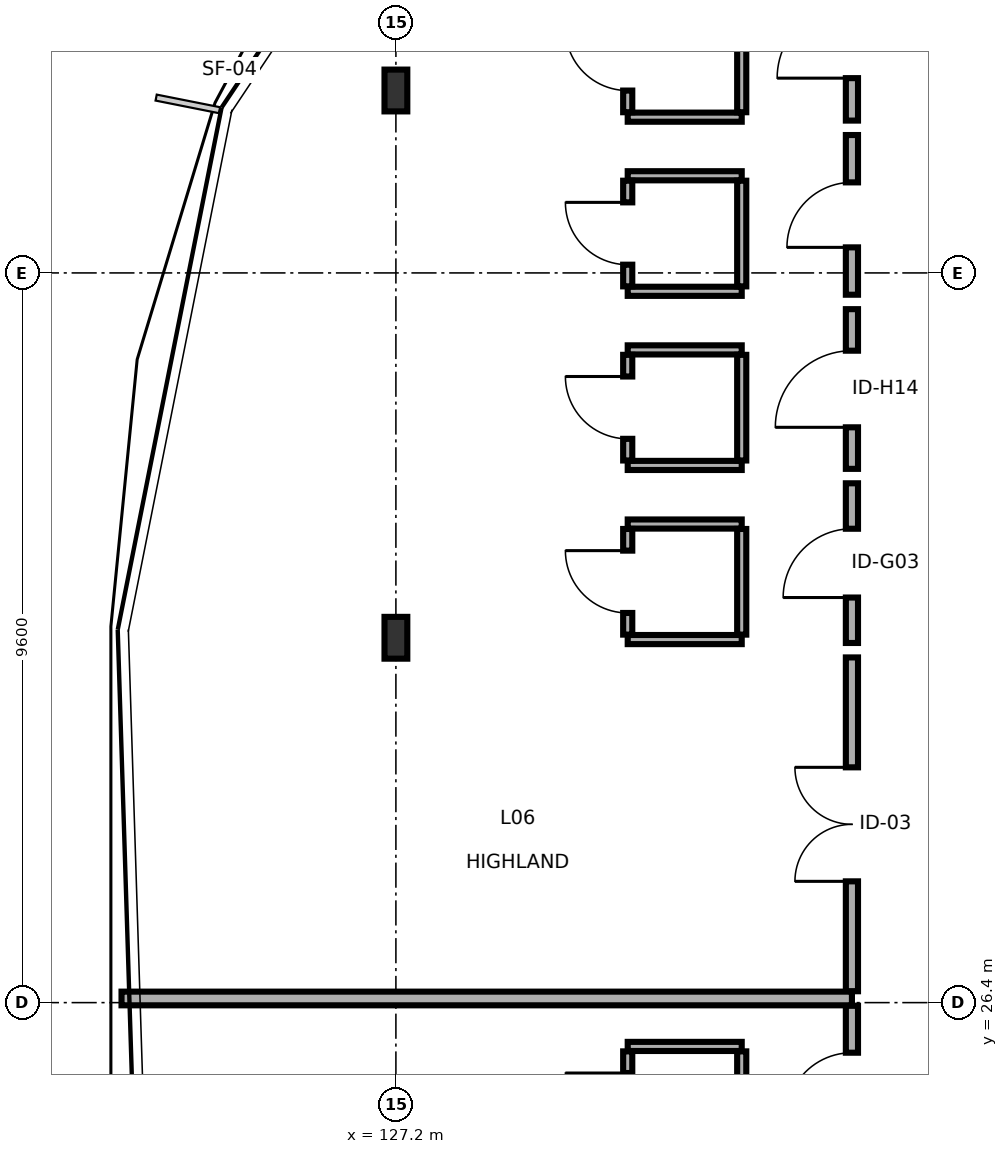
"""IFC4 building model, lengths in metres.
Left out: names, types, materials, properties, quantities, classifications, styles, units other than length and angle.
Written with IfcOpenShell. Run it as: python <this file> out.ifc"""

import sys

from ifc_helpers import new_model, si_unit, direction, frame, frame_2d, origin, origin_2d, place, context, subcontext, project, spatial, rectangle, i_section, extrude, element, fill, save


model = new_model("IFC4")
c1 = context("Model", 3, precision=1e-05, world=origin(), true_north=direction((0.0, 1.0)))
c2 = subcontext(c1, "Body", "Model", "MODEL_VIEW")
j1 = project(units=[si_unit("LENGTHUNIT", "METRE"), si_unit("PLANEANGLEUNIT", "RADIAN")], contexts=[c1])
p1 = place(None, origin())
s1 = spatial("IfcSite", under=j1, at=p1, CompositionType="ELEMENT")
p2 = place(p1, origin())
s2 = spatial("IfcBuilding", under=s1, at=p2, CompositionType="ELEMENT")
p3 = place(p2, frame((0.0, 0.0, 21.5)))
s3 = spatial("IfcBuildingStorey", under=s2, at=p3, CompositionType="ELEMENT", Elevation=21.5)
for number, where, z_axis, x_axis in (
    (1, (127.2, 38.4, 0.0), (0.0, 0.0, 1.0), (1.0, 0.0, 0.0)),
    (2, (127.2, 31.2, 0.0), (0.0, 0.0, 1.0), (1.0, 0.0, 0.0)),
):
    element("IfcColumn", number, at=place(p3, frame(where, z_axis=z_axis, x_axis=x_axis)), inside=s3, PredefinedType="COLUMN", context=c2, shape_type="SweptSolid", body=[
        extrude(i_section(OverallWidth=0.3, OverallDepth=0.55, WebThickness=0.015, FlangeThickness=0.029, FilletRadius=0.027, at=origin_2d()), origin(), (0.0, 0.0, 1.0), 3.4),
    ])
p4 = place(p3, frame((133.2, 26.55, 0.0), z_axis=(0.0, 0.0, 1.0), x_axis=(0.0, 1.0, 0.0)))
e3 = element("IfcWall", 3, at=p4, inside=s3, PredefinedType="PARTITIONING", context=c2, shape_type="SweptSolid", body=[
    extrude(rectangle(XDim=4.392, YDim=0.16, at=frame_2d((2.196, 0.0))), origin(), (0.0, 0.0, 1.0), 3.195),
])
p5 = place(p4, frame((1.446, 0.0, 0.0)))
e4 = element("IfcOpeningElement", 4, at=p5, cuts=e3, PredefinedType="OPENING", context=c2, shape_type="SweptSolid", body=[
    extrude(rectangle(XDim=1.5, YDim=2.25, at=frame_2d((0.75, 1.125))), frame((0.0, 0.09, 0.0), z_axis=(0.0, -1.0, 0.0), x_axis=(1.0, 0.0, 0.0)), (0.0, 0.0, 1.0), 0.18),
])
p6 = place(p3, frame((133.2, 38.004, 0.0), z_axis=(0.0, 0.0, 1.0), x_axis=(0.0, 1.0, 0.0)))
e5 = element("IfcWall", 5, at=p6, inside=s3, PredefinedType="PARTITIONING", context=c2, shape_type="SweptSolid", body=[
    extrude(rectangle(XDim=2.101, YDim=0.16, at=frame_2d((1.05, 0.0))), origin(), (0.0, 0.0, 1.0), 2.73),
])
p7 = place(p6, frame((0.558, 0.0, 0.0)))
e6 = element("IfcOpeningElement", 6, at=p7, cuts=e5, PredefinedType="OPENING", context=c2, shape_type="SweptSolid", body=[
    extrude(rectangle(XDim=0.984, YDim=2.07, at=frame_2d((0.492, 1.035))), frame((0.0, 0.09, 0.0), z_axis=(0.0, -1.0, 0.0), x_axis=(1.0, 0.0, 0.0)), (0.0, 0.0, 1.0), 0.18),
])
p8 = place(p3, frame((130.25, 38.049, 0.0), z_axis=(0.0, 0.0, 1.0), x_axis=(1.0, 0.0, 0.0)))
e7 = element("IfcWall", 7, at=p8, inside=s3, PredefinedType="PARTITIONING", context=c2, shape_type="SweptSolid", body=[
    extrude(rectangle(XDim=1.5, YDim=0.12, at=frame_2d((0.75, 0.0))), origin(), (0.0, 0.0, 1.0), 3.195),
])
p9 = place(p3, frame((130.25, 38.114, 0.0), z_axis=(0.0, 0.0, 1.0), x_axis=(0.0, 1.0, 0.0)))
e8 = element("IfcWall", 8, at=p9, inside=s3, PredefinedType="PARTITIONING", context=c2, shape_type="SweptSolid", body=[
    extrude(rectangle(XDim=1.39, YDim=0.12, at=frame_2d((0.695, 0.0))), origin(), (0.0, 0.0, 1.0), 2.73),
])
p10 = place(p9, frame((0.285, 0.0, 0.0)))
e9 = element("IfcOpeningElement", 9, at=p10, cuts=e8, PredefinedType="OPENING", context=c2, shape_type="SweptSolid", body=[
    extrude(rectangle(XDim=0.82, YDim=2.08, at=frame_2d((0.41, 1.04))), frame((0.0, 0.07, 0.0), z_axis=(0.0, -1.0, 0.0), x_axis=(1.0, 0.0, 0.0)), (0.0, 0.0, 1.0), 0.14),
])
p11 = place(p3, frame((131.75, 38.114, 0.0), z_axis=(0.0, 0.0, 1.0), x_axis=(0.0, 1.0, 0.0)))
e10 = element("IfcWall", 10, at=p11, inside=s3, PredefinedType="PARTITIONING", context=c2, shape_type="SweptSolid", body=[
    extrude(rectangle(XDim=1.39, YDim=0.12, at=frame_2d((0.695, 0.0))), origin(), (0.0, 0.0, 1.0), 2.73),
])
p12 = place(p3, frame((133.2, 35.713, 0.0), z_axis=(0.0, 0.0, 1.0), x_axis=(0.0, 1.0, 0.0)))
e11 = element("IfcWall", 11, at=p12, inside=s3, PredefinedType="PARTITIONING", context=c2, shape_type="SweptSolid", body=[
    extrude(rectangle(XDim=2.101, YDim=0.16, at=frame_2d((1.051, 0.0))), origin(), (0.0, 0.0, 1.0), 3.195),
])
p13 = place(p12, frame((0.623, 0.0, 0.0)))
e12 = element("IfcOpeningElement", 12, at=p13, cuts=e11, PredefinedType="OPENING", context=c2, shape_type="SweptSolid", body=[
    extrude(rectangle(XDim=0.855, YDim=2.05, at=frame_2d((0.427, 1.025))), frame((0.0, 0.09, 0.0), z_axis=(0.0, -1.0, 0.0), x_axis=(1.0, 0.0, 0.0)), (0.0, 0.0, 1.0), 0.18),
])
for number, where, z_axis, x_axis in (
    (13, (130.25, 35.758, 0.0), (0.0, 0.0, 1.0), (1.0, 0.0, 0.0)),
    (14, (130.25, 37.278, 0.0), (0.0, 0.0, 1.0), (1.0, 0.0, 0.0)),
):
    element("IfcWall", number, at=place(p3, frame(where, z_axis=z_axis, x_axis=x_axis)), inside=s3, PredefinedType="PARTITIONING", context=c2, shape_type="SweptSolid", body=[
        extrude(rectangle(XDim=1.5, YDim=0.12, at=frame_2d((0.75, 0.0))), origin(), (0.0, 0.0, 1.0), 3.195),
    ])
p14 = place(p3, frame((130.25, 35.823, 0.0), z_axis=(0.0, 0.0, 1.0), x_axis=(0.0, 1.0, 0.0)))
e15 = element("IfcWall", 15, at=p14, inside=s3, PredefinedType="PARTITIONING", context=c2, shape_type="SweptSolid", body=[
    extrude(rectangle(XDim=1.39, YDim=0.12, at=frame_2d((0.695, 0.0))), origin(), (0.0, 0.0, 1.0), 3.195),
])
p15 = place(p14, frame((0.285, 0.0, 0.0)))
e16 = element("IfcOpeningElement", 16, at=p15, cuts=e15, PredefinedType="OPENING", context=c2, shape_type="SweptSolid", body=[
    extrude(rectangle(XDim=0.82, YDim=2.08, at=frame_2d((0.41, 1.04))), frame((0.0, 0.07, 0.0), z_axis=(0.0, -1.0, 0.0), x_axis=(1.0, 0.0, 0.0)), (0.0, 0.0, 1.0), 0.14),
])
p16 = place(p3, frame((131.75, 35.823, 0.0), z_axis=(0.0, 0.0, 1.0), x_axis=(0.0, 1.0, 0.0)))
e17 = element("IfcWall", 17, at=p16, inside=s3, PredefinedType="PARTITIONING", context=c2, shape_type="SweptSolid", body=[
    extrude(rectangle(XDim=1.39, YDim=0.12, at=frame_2d((0.695, 0.0))), origin(), (0.0, 0.0, 1.0), 3.195),
])
p17 = place(p3, frame((133.2, 33.422, 0.0), z_axis=(0.0, 0.0, 1.0), x_axis=(0.0, 1.0, 0.0)))
e18 = element("IfcWall", 18, at=p17, inside=s3, PredefinedType="PARTITIONING", context=c2, shape_type="SweptSolid", body=[
    extrude(rectangle(XDim=2.101, YDim=0.16, at=frame_2d((1.05, 0.0))), origin(), (0.0, 0.0, 1.0), 3.195),
])
p18 = place(p17, frame((0.546, 0.0, 0.0)))
e19 = element("IfcOpeningElement", 19, at=p18, cuts=e18, PredefinedType="OPENING", context=c2, shape_type="SweptSolid", body=[
    extrude(rectangle(XDim=1.008, YDim=2.13, at=frame_2d((0.504, 1.065))), frame((0.0, 0.09, 0.0), z_axis=(0.0, -1.0, 0.0), x_axis=(1.0, 0.0, 0.0)), (0.0, 0.0, 1.0), 0.18),
])
for number, where, z_axis, x_axis in (
    (20, (130.25, 33.467, 0.0), (0.0, 0.0, 1.0), (1.0, 0.0, 0.0)),
    (21, (130.25, 34.987, 0.0), (0.0, 0.0, 1.0), (1.0, 0.0, 0.0)),
):
    element("IfcWall", number, at=place(p3, frame(where, z_axis=z_axis, x_axis=x_axis)), inside=s3, PredefinedType="PARTITIONING", context=c2, shape_type="SweptSolid", body=[
        extrude(rectangle(XDim=1.5, YDim=0.12, at=frame_2d((0.75, 0.0))), origin(), (0.0, 0.0, 1.0), 3.195),
    ])
p19 = place(p3, frame((130.25, 33.532, 0.0), z_axis=(0.0, 0.0, 1.0), x_axis=(0.0, 1.0, 0.0)))
e22 = element("IfcWall", 22, at=p19, inside=s3, PredefinedType="PARTITIONING", context=c2, shape_type="SweptSolid", body=[
    extrude(rectangle(XDim=1.39, YDim=0.12, at=frame_2d((0.695, 0.0))), origin(), (0.0, 0.0, 1.0), 3.195),
])
p20 = place(p19, frame((0.285, 0.0, 0.0)))
e23 = element("IfcOpeningElement", 23, at=p20, cuts=e22, PredefinedType="OPENING", context=c2, shape_type="SweptSolid", body=[
    extrude(rectangle(XDim=0.82, YDim=2.08, at=frame_2d((0.41, 1.04))), frame((0.0, 0.07, 0.0), z_axis=(0.0, -1.0, 0.0), x_axis=(1.0, 0.0, 0.0)), (0.0, 0.0, 1.0), 0.14),
])
p21 = place(p3, frame((131.75, 33.532, 0.0), z_axis=(0.0, 0.0, 1.0), x_axis=(0.0, 1.0, 0.0)))
e24 = element("IfcWall", 24, at=p21, inside=s3, PredefinedType="PARTITIONING", context=c2, shape_type="SweptSolid", body=[
    extrude(rectangle(XDim=1.39, YDim=0.12, at=frame_2d((0.695, 0.0))), origin(), (0.0, 0.0, 1.0), 3.195),
])
p22 = place(p3, frame((133.2, 31.131, 0.0), z_axis=(0.0, 0.0, 1.0), x_axis=(0.0, 1.0, 0.0)))
e25 = element("IfcWall", 25, at=p22, inside=s3, PredefinedType="PARTITIONING", context=c2, shape_type="SweptSolid", body=[
    extrude(rectangle(XDim=2.101, YDim=0.16, at=frame_2d((1.051, 0.0))), origin(), (0.0, 0.0, 1.0), 2.73),
])
p23 = place(p22, frame((0.598, 0.0, 0.0)))
e26 = element("IfcOpeningElement", 26, at=p23, cuts=e25, PredefinedType="OPENING", context=c2, shape_type="SweptSolid", body=[
    extrude(rectangle(XDim=0.905, YDim=2.05, at=frame_2d((0.453, 1.025))), frame((0.0, 0.09, 0.0), z_axis=(0.0, -1.0, 0.0), x_axis=(1.0, 0.0, 0.0)), (0.0, 0.0, 1.0), 0.18),
])
p24 = place(p3, frame((130.25, 31.177, 0.0), z_axis=(0.0, 0.0, 1.0), x_axis=(1.0, 0.0, 0.0)))
e27 = element("IfcWall", 27, at=p24, inside=s3, PredefinedType="PARTITIONING", context=c2, shape_type="SweptSolid", body=[
    extrude(rectangle(XDim=1.5, YDim=0.12, at=frame_2d((0.75, 0.0))), origin(), (0.0, 0.0, 1.0), 2.73),
])
p25 = place(p3, frame((130.25, 32.696, 0.0), z_axis=(0.0, 0.0, 1.0), x_axis=(1.0, 0.0, 0.0)))
e28 = element("IfcWall", 28, at=p25, inside=s3, PredefinedType="PARTITIONING", context=c2, shape_type="SweptSolid", body=[
    extrude(rectangle(XDim=1.5, YDim=0.12, at=frame_2d((0.75, 0.0))), origin(), (0.0, 0.0, 1.0), 3.195),
])
p26 = place(p3, frame((130.25, 31.241, 0.0), z_axis=(0.0, 0.0, 1.0), x_axis=(0.0, 1.0, 0.0)))
e29 = element("IfcWall", 29, at=p26, inside=s3, PredefinedType="PARTITIONING", context=c2, shape_type="SweptSolid", body=[
    extrude(rectangle(XDim=1.39, YDim=0.12, at=frame_2d((0.695, 0.0))), origin(), (0.0, 0.0, 1.0), 2.73),
])
p27 = place(p26, frame((0.285, 0.0, 0.0)))
e30 = element("IfcOpeningElement", 30, at=p27, cuts=e29, PredefinedType="OPENING", context=c2, shape_type="SweptSolid", body=[
    extrude(rectangle(XDim=0.82, YDim=2.08, at=frame_2d((0.41, 1.04))), frame((0.0, 0.07, 0.0), z_axis=(0.0, -1.0, 0.0), x_axis=(1.0, 0.0, 0.0)), (0.0, 0.0, 1.0), 0.14),
])
p28 = place(p3, frame((131.75, 31.241, 0.0), z_axis=(0.0, 0.0, 1.0), x_axis=(0.0, 1.0, 0.0)))
e31 = element("IfcWall", 31, at=p28, inside=s3, PredefinedType="PARTITIONING", context=c2, shape_type="SweptSolid", body=[
    extrude(rectangle(XDim=1.39, YDim=0.12, at=frame_2d((0.695, 0.0))), origin(), (0.0, 0.0, 1.0), 2.73),
])
p29 = place(p3, frame((133.2, 24.259, 0.0), z_axis=(0.0, 0.0, 1.0), x_axis=(0.0, 1.0, 0.0)))
e32 = element("IfcWall", 32, at=p29, inside=s3, PredefinedType="PARTITIONING", context=c2, shape_type="SweptSolid", body=[
    extrude(rectangle(XDim=2.101, YDim=0.16, at=frame_2d((1.051, 0.0))), origin(), (0.0, 0.0, 1.0), 3.195),
])
p30 = place(p29, frame((0.618, 0.0, 0.0)))
e33 = element("IfcOpeningElement", 33, at=p30, cuts=e32, PredefinedType="OPENING", context=c2, shape_type="SweptSolid", body=[
    extrude(rectangle(XDim=0.864, YDim=2.13, at=frame_2d((0.432, 1.065))), frame((0.0, 0.09, 0.0), z_axis=(0.0, -1.0, 0.0), x_axis=(1.0, 0.0, 0.0)), (0.0, 0.0, 1.0), 0.18),
])
p31 = place(p3, frame((130.25, 25.823, 0.0), z_axis=(0.0, 0.0, 1.0), x_axis=(1.0, 0.0, 0.0)))
e34 = element("IfcWall", 34, at=p31, inside=s3, PredefinedType="PARTITIONING", context=c2, shape_type="SweptSolid", body=[
    extrude(rectangle(XDim=1.5, YDim=0.12, at=frame_2d((0.75, 0.0))), origin(), (0.0, 0.0, 1.0), 3.195),
])
p32 = place(p3, frame((130.25, 24.369, 0.0), z_axis=(0.0, 0.0, 1.0), x_axis=(0.0, 1.0, 0.0)))
e35 = element("IfcWall", 35, at=p32, inside=s3, PredefinedType="PARTITIONING", context=c2, shape_type="SweptSolid", body=[
    extrude(rectangle(XDim=1.39, YDim=0.12, at=frame_2d((0.695, 0.0))), origin(), (0.0, 0.0, 1.0), 3.195),
])
p33 = place(p32, frame((0.285, 0.0, 0.0)))
e36 = element("IfcOpeningElement", 36, at=p33, cuts=e35, PredefinedType="OPENING", context=c2, shape_type="SweptSolid", body=[
    extrude(rectangle(XDim=0.82, YDim=2.08, at=frame_2d((0.41, 1.04))), frame((0.0, 0.07, 0.0), z_axis=(0.0, -1.0, 0.0), x_axis=(1.0, 0.0, 0.0)), (0.0, 0.0, 1.0), 0.14),
])
p34 = place(p3, frame((131.75, 24.369, 0.0), z_axis=(0.0, 0.0, 1.0), x_axis=(0.0, 1.0, 0.0)))
e37 = element("IfcWall", 37, at=p34, inside=s3, PredefinedType="PARTITIONING", context=c2, shape_type="SweptSolid", body=[
    extrude(rectangle(XDim=1.39, YDim=0.12, at=frame_2d((0.695, 0.0))), origin(), (0.0, 0.0, 1.0), 3.195),
])
p35 = place(p3, frame((123.59, 26.455, 0.0), z_axis=(0.0, 0.0, 1.0), x_axis=(1.0, 0.0, 0.0)))
e38 = element("IfcWall", 38, at=p35, inside=s3, PredefinedType="PARTITIONING", context=c2, shape_type="SweptSolid", body=[
    extrude(rectangle(XDim=9.61, YDim=0.18, at=frame_2d((4.805, 0.0))), origin(), (0.0, 0.0, 1.0), 2.68),
])
p36 = place(p5, origin())
e39 = element("IfcDoor", 39, at=p36, inside=s3, OperationType="DOUBLE_DOOR_SINGLE_SWING", PredefinedType="DOOR", context=c2, shape_type="SweptSolid", body=[
    extrude(rectangle(XDim=1.5, YDim=2.25, at=frame_2d((0.75, 1.125))), frame((0.0, 0.025, 0.0), z_axis=(0.0, -1.0, 0.0), x_axis=(1.0, 0.0, 0.0)), (0.0, 0.0, 1.0), 0.05),
])
fill(e4, e39)
p37 = place(p7, origin())
e40 = element("IfcDoor", 40, at=p37, inside=s3, OperationType="SINGLE_SWING_LEFT", PredefinedType="DOOR", context=c2, shape_type="SweptSolid", body=[
    extrude(rectangle(XDim=0.984, YDim=2.07, at=frame_2d((0.492, 1.035))), frame((0.0, 0.025, 0.0), z_axis=(0.0, -1.0, 0.0), x_axis=(1.0, 0.0, 0.0)), (0.0, 0.0, 1.0), 0.05),
])
fill(e6, e40)
p38 = place(p10, origin())
e41 = element("IfcDoor", 41, at=p38, inside=s3, OperationType="SINGLE_SWING_RIGHT", PredefinedType="DOOR", context=c2, shape_type="SweptSolid", body=[
    extrude(rectangle(XDim=0.82, YDim=2.08, at=frame_2d((0.41, 1.04))), frame((0.0, 0.025, 0.0), z_axis=(0.0, -1.0, 0.0), x_axis=(1.0, 0.0, 0.0)), (0.0, 0.0, 1.0), 0.05),
])
fill(e9, e41)
p39 = place(p13, origin())
e42 = element("IfcDoor", 42, at=p39, inside=s3, OperationType="SINGLE_SWING_LEFT", PredefinedType="DOOR", context=c2, shape_type="SweptSolid", body=[
    extrude(rectangle(XDim=0.855, YDim=2.05, at=frame_2d((0.427, 1.025))), frame((0.0, 0.025, 0.0), z_axis=(0.0, -1.0, 0.0), x_axis=(1.0, 0.0, 0.0)), (0.0, 0.0, 1.0), 0.05),
])
fill(e12, e42)
p40 = place(p15, origin())
e43 = element("IfcDoor", 43, at=p40, inside=s3, OperationType="SINGLE_SWING_RIGHT", PredefinedType="DOOR", context=c2, shape_type="SweptSolid", body=[
    extrude(rectangle(XDim=0.82, YDim=2.08, at=frame_2d((0.41, 1.04))), frame((0.0, 0.025, 0.0), z_axis=(0.0, -1.0, 0.0), x_axis=(1.0, 0.0, 0.0)), (0.0, 0.0, 1.0), 0.05),
])
fill(e16, e43)
p41 = place(p18, origin())
e44 = element("IfcDoor", 44, at=p41, inside=s3, OperationType="SINGLE_SWING_LEFT", PredefinedType="DOOR", context=c2, shape_type="SweptSolid", body=[
    extrude(rectangle(XDim=1.008, YDim=2.13, at=frame_2d((0.504, 1.065))), frame((0.0, 0.025, 0.0), z_axis=(0.0, -1.0, 0.0), x_axis=(1.0, 0.0, 0.0)), (0.0, 0.0, 1.0), 0.05),
])
fill(e19, e44)
p42 = place(p20, origin())
e45 = element("IfcDoor", 45, at=p42, inside=s3, OperationType="SINGLE_SWING_RIGHT", PredefinedType="DOOR", context=c2, shape_type="SweptSolid", body=[
    extrude(rectangle(XDim=0.82, YDim=2.08, at=frame_2d((0.41, 1.04))), frame((0.0, 0.025, 0.0), z_axis=(0.0, -1.0, 0.0), x_axis=(1.0, 0.0, 0.0)), (0.0, 0.0, 1.0), 0.05),
])
fill(e23, e45)
p43 = place(p23, origin())
e46 = element("IfcDoor", 46, at=p43, inside=s3, OperationType="SINGLE_SWING_LEFT", PredefinedType="DOOR", context=c2, shape_type="SweptSolid", body=[
    extrude(rectangle(XDim=0.905, YDim=2.05, at=frame_2d((0.453, 1.025))), frame((0.0, 0.025, 0.0), z_axis=(0.0, -1.0, 0.0), x_axis=(1.0, 0.0, 0.0)), (0.0, 0.0, 1.0), 0.05),
])
fill(e26, e46)
p44 = place(p27, origin())
e47 = element("IfcDoor", 47, at=p44, inside=s3, OperationType="SINGLE_SWING_RIGHT", PredefinedType="DOOR", context=c2, shape_type="SweptSolid", body=[
    extrude(rectangle(XDim=0.82, YDim=2.08, at=frame_2d((0.41, 1.04))), frame((0.0, 0.025, 0.0), z_axis=(0.0, -1.0, 0.0), x_axis=(1.0, 0.0, 0.0)), (0.0, 0.0, 1.0), 0.05),
])
fill(e30, e47)
p45 = place(p30, origin())
e48 = element("IfcDoor", 48, at=p45, inside=s3, OperationType="SINGLE_SWING_LEFT", PredefinedType="DOOR", context=c2, shape_type="SweptSolid", body=[
    extrude(rectangle(XDim=0.864, YDim=2.13, at=frame_2d((0.432, 1.065))), frame((0.0, 0.025, 0.0), z_axis=(0.0, -1.0, 0.0), x_axis=(1.0, 0.0, 0.0)), (0.0, 0.0, 1.0), 0.05),
])
fill(e33, e48)
p46 = place(p33, origin())
e49 = element("IfcDoor", 49, at=p46, inside=s3, OperationType="SINGLE_SWING_RIGHT", PredefinedType="DOOR", context=c2, shape_type="SweptSolid", body=[
    extrude(rectangle(XDim=0.82, YDim=2.08, at=frame_2d((0.41, 1.04))), frame((0.0, 0.025, 0.0), z_axis=(0.0, -1.0, 0.0), x_axis=(1.0, 0.0, 0.0)), (0.0, 0.0, 1.0), 0.05),
])
fill(e36, e49)
save(model, sys.argv[1])
